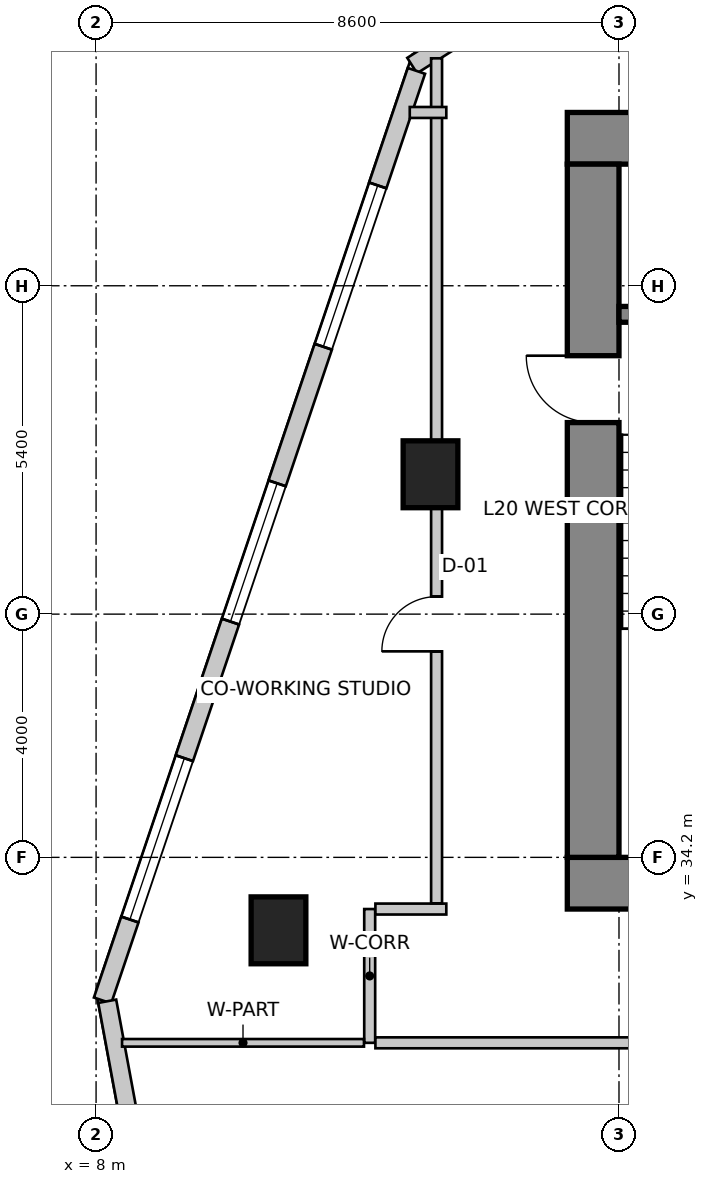
"""IFC4 building model, lengths in metres.
Left out: names, types, materials, properties, quantities, classifications, styles, units other than length and angle.
Written with IfcOpenShell. Run it as: python <this file> out.ifc"""

import sys

from ifc_helpers import new_model, si_unit, direction, frame, frame_2d, origin, origin_2d, place, context, subcontext, project, spatial, rectangle, extrude, source, transform, mapped, element, fill, save


model = new_model("IFC4")
c1 = context("Model", 3, precision=1e-05, world=origin(), true_north=direction((0.0, 1.0)))
c2 = subcontext(c1, "Body", "Model", "MODEL_VIEW")
j1 = project(units=[si_unit("LENGTHUNIT", "METRE"), si_unit("PLANEANGLEUNIT", "RADIAN")], contexts=[c1])
p1 = place(None, origin())
s1 = spatial("IfcSite", under=j1, at=p1, CompositionType="ELEMENT")
p2 = place(p1, origin())
s2 = spatial("IfcBuilding", under=s1, at=p2, CompositionType="ELEMENT")
p3 = place(p2, frame((0.0, 0.0, 83.0)))
s3 = spatial("IfcBuildingStorey", under=s2, at=p3, CompositionType="ELEMENT", Elevation=83.0)
p4 = place(p3, frame((15.75, 46.025, 0.0), z_axis=(0.0, 0.0, 1.0), x_axis=(1.0, 0.0, 0.0)))
e1 = element("IfcWall", 1, at=p4, inside=s3, PredefinedType="SHEAR", context=c2, shape_type="SweptSolid", body=[
    extrude(rectangle(XDim=16.1, YDim=0.85, at=frame_2d((8.05, 0.0))), origin(), (0.0, 0.0, 1.0), 4.0),
])
p5 = place(p3, frame((15.75, 33.775, 0.0), z_axis=(0.0, 0.0, 1.0), x_axis=(1.0, 0.0, 0.0)))
e2 = element("IfcWall", 2, at=p5, inside=s3, PredefinedType="SHEAR", context=c2, shape_type="SweptSolid", body=[
    extrude(rectangle(XDim=16.1, YDim=0.85, at=frame_2d((8.05, 0.0))), origin(), (0.0, 0.0, 1.0), 4.0),
])
m1 = source(origin(), c2, "Body", "SweptSolid", [
    extrude(rectangle(XDim=1.3, YDim=2.15, at=frame_2d((0.65, 1.075))), frame((0.0, 0.435, 0.0), z_axis=(0.0, -1.0, 0.0), x_axis=(1.0, 0.0, 0.0)), (0.0, 0.0, 1.0), 0.87),
])
p6 = place(p5, frame((10.18, 0.0, 0.0)))
e3 = element("IfcOpeningElement", 3, at=p6, cuts=e2, PredefinedType="OPENING", context=c2, shape_type="MappedRepresentation", body=[
    mapped(m1, transform((0.0, 0.0, 0.0), scale=1.0)),
])
p7 = place(p3, frame((16.175, 34.2, 0.0), z_axis=(0.0, 0.0, 1.0), x_axis=(0.0, 1.0, 0.0)))
e4 = element("IfcWall", 4, at=p7, inside=s3, PredefinedType="SHEAR", context=c2, shape_type="SweptSolid", body=[
    extrude(rectangle(XDim=11.4, YDim=0.85, at=frame_2d((5.7, 0.0))), origin(), (0.0, 0.0, 1.0), 4.0),
])
m2 = source(origin(), c2, "Body", "SweptSolid", [
    extrude(rectangle(XDim=1.1, YDim=2.15, at=frame_2d((0.55, 1.075))), frame((0.0, 0.435, 0.0), z_axis=(0.0, -1.0, 0.0), x_axis=(1.0, 0.0, 0.0)), (0.0, 0.0, 1.0), 0.87),
])
p8 = place(p7, frame((7.15, 0.0, 0.0)))
e5 = element("IfcOpeningElement", 5, at=p8, cuts=e4, PredefinedType="OPENING", context=c2, shape_type="MappedRepresentation", body=[
    mapped(m2, transform((0.0, 0.0, 0.0), scale=1.0)),
])
p9 = place(p3, frame((16.6, 43.13, 0.0), z_axis=(0.0, 0.0, 1.0), x_axis=(1.0, 0.0, 0.0)))
e6 = element("IfcWall", 6, at=p9, inside=s3, PredefinedType="SHEAR", context=c2, shape_type="SweptSolid", body=[
    extrude(rectangle(XDim=3.5, YDim=0.26, at=frame_2d((1.75, 0.0))), origin(), (0.0, 0.0, 1.0), 4.0),
])
m3 = source(origin(), c2, "Body", "SweptSolid", [
    extrude(rectangle(XDim=0.9, YDim=1.1, at=origin_2d()), origin(), (0.0, 0.0, 1.0), 4.0),
])
for number, where, z_axis, x_axis in (
    (7, (11.0, 33.0, 0.0), (0.0, 0.0, 1.0), (1.0, 0.0, 0.0)),
    (8, (13.5, 40.5, 0.0), (0.0, 0.0, 1.0), (1.0, 0.0, 0.0)),
):
    element("IfcColumn", number, at=place(p3, frame(where, z_axis=z_axis, x_axis=x_axis)), inside=s3, PredefinedType="COLUMN", context=c2, shape_type="MappedRepresentation", body=[
        mapped(m3, transform((0.0, 0.0, 0.0), scale=1.0)),
    ])
p10 = place(p3, frame((21.875, 52.742, 0.0), z_axis=(0.0, 0.0, 1.0), x_axis=(-0.843662465249, -0.536873956092, 0.0)))
e9 = element("IfcWall", 9, at=p10, inside=s3, PredefinedType="SOLIDWALL", context=c2, shape_type="SweptSolid", body=[
    extrude(rectangle(XDim=10.284, YDim=0.3, at=frame_2d((5.142, 0.0))), origin(), (0.0, 0.0, 1.0), 3.75),
])
m4 = source(origin(), c2, "Body", "SweptSolid", [
    extrude(rectangle(XDim=0.9, YDim=1.6, at=frame_2d((0.45, 0.8))), frame((0.0, 0.16, 0.0), z_axis=(0.0, -1.0, 0.0), x_axis=(1.0, 0.0, 0.0)), (0.0, 0.0, 1.0), 0.32),
])
p11 = place(p10, frame((0.629, 0.0, 0.85)))
e10 = element("IfcOpeningElement", 10, at=p11, cuts=e9, PredefinedType="OPENING", context=c2, shape_type="MappedRepresentation", body=[
    mapped(m4, transform((0.0, 0.0, 0.0), scale=1.0)),
])
m5 = source(origin(), c2, "Body", "SweptSolid", [
    extrude(rectangle(XDim=2.4, YDim=2.2, at=frame_2d((1.2, 1.1))), frame((0.0, 0.16, 0.0), z_axis=(0.0, -1.0, 0.0), x_axis=(1.0, 0.0, 0.0)), (0.0, 0.0, 1.0), 0.32),
])
p12 = place(p10, frame((3.542, 0.0, 0.85)))
e11 = element("IfcOpeningElement", 11, at=p12, cuts=e9, PredefinedType="OPENING", context=c2, shape_type="MappedRepresentation", body=[
    mapped(m5, transform((0.0, 0.0, 0.0), scale=1.0)),
])
m6 = source(origin(), c2, "Body", "SweptSolid", [
    extrude(rectangle(XDim=1.5, YDim=1.8, at=frame_2d((0.75, 0.9))), frame((0.0, 0.16, 0.0), z_axis=(0.0, -1.0, 0.0), x_axis=(1.0, 0.0, 0.0)), (0.0, 0.0, 1.0), 0.32),
])
p13 = place(p10, frame((7.903, 0.0, 0.85)))
e12 = element("IfcOpeningElement", 12, at=p13, cuts=e9, PredefinedType="OPENING", context=c2, shape_type="MappedRepresentation", body=[
    mapped(m6, transform((0.0, 0.0, 0.0), scale=1.0)),
])
p14 = place(p3, frame((13.269, 47.134, 0.0), z_axis=(0.0, 0.0, 1.0), x_axis=(-0.319920423265, -0.947444416722, 0.0)))
e13 = element("IfcWall", 13, at=p14, inside=s3, PredefinedType="SOLIDWALL", context=c2, shape_type="SweptSolid", body=[
    extrude(rectangle(XDim=16.135, YDim=0.3, at=frame_2d((8.067, 0.0))), origin(), (0.0, 0.0, 1.0), 3.75),
])
m7 = source(origin(), c2, "Body", "SweptSolid", [
    extrude(rectangle(XDim=2.8, YDim=2.4, at=frame_2d((1.4, 1.2))), frame((0.0, 0.16, 0.0), z_axis=(0.0, -1.0, 0.0), x_axis=(1.0, 0.0, 0.0)), (0.0, 0.0, 1.0), 0.32),
])
p15 = place(p14, frame((1.988, 0.0, 0.85)))
e14 = element("IfcOpeningElement", 14, at=p15, cuts=e13, PredefinedType="OPENING", context=c2, shape_type="MappedRepresentation", body=[
    mapped(m7, transform((0.0, 0.0, 0.0), scale=1.0)),
])
p16 = place(p14, frame((7.159, 0.0, 0.85)))
e15 = element("IfcOpeningElement", 15, at=p16, cuts=e13, PredefinedType="OPENING", context=c2, shape_type="MappedRepresentation", body=[
    mapped(m5, transform((0.0, 0.0, 0.0), scale=1.0)),
])
p17 = place(p14, frame((11.93, 0.0, 0.85)))
e16 = element("IfcOpeningElement", 16, at=p17, cuts=e13, PredefinedType="OPENING", context=c2, shape_type="MappedRepresentation", body=[
    mapped(m7, transform((0.0, 0.0, 0.0), scale=1.0)),
])
p18 = place(p3, frame((8.183, 31.833, 0.0), z_axis=(0.0, 0.0, 1.0), x_axis=(0.18216364648, -0.983268226834, 0.0)))
e17 = element("IfcWall", 17, at=p18, inside=s3, PredefinedType="SOLIDWALL", context=c2, shape_type="SweptSolid", body=[
    extrude(rectangle(XDim=26.678, YDim=0.3, at=frame_2d((13.339, 0.0))), origin(), (0.0, 0.0, 1.0), 3.75),
])
p19 = place(p18, frame((3.152, 0.0, 0.85)))
e18 = element("IfcOpeningElement", 18, at=p19, cuts=e17, PredefinedType="OPENING", context=c2, shape_type="MappedRepresentation", body=[
    mapped(m5, transform((0.0, 0.0, 0.0), scale=1.0)),
])
p20 = place(p18, frame((9.076, 0.0, 0.85)))
e19 = element("IfcOpeningElement", 19, at=p20, cuts=e17, PredefinedType="OPENING", context=c2, shape_type="MappedRepresentation", body=[
    mapped(m5, transform((0.0, 0.0, 0.0), scale=1.0)),
])
p21 = place(p18, frame((13.653, 0.0, 0.85)))
e20 = element("IfcOpeningElement", 20, at=p21, cuts=e17, PredefinedType="OPENING", context=c2, shape_type="MappedRepresentation", body=[
    mapped(m5, transform((0.0, 0.0, 0.0), scale=1.0)),
])
p22 = place(p18, frame((18.411, 0.0, 0.85)))
e21 = element("IfcOpeningElement", 21, at=p22, cuts=e17, PredefinedType="OPENING", context=c2, shape_type="MappedRepresentation", body=[
    mapped(m5, transform((0.0, 0.0, 0.0), scale=1.0)),
])
p23 = place(p18, frame((22.709, 0.0, 0.85)))
e22 = element("IfcOpeningElement", 22, at=p23, cuts=e17, PredefinedType="OPENING", context=c2, shape_type="MappedRepresentation", body=[
    mapped(m7, transform((0.0, 0.0, 0.0), scale=1.0)),
])
p24 = place(p3, frame((12.5, 31.15, 0.0), z_axis=(0.0, 0.0, 1.0), x_axis=(0.0, 1.0, 0.0)))
e23 = element("IfcWall", 23, at=p24, inside=s3, PredefinedType="PARTITIONING", context=c2, shape_type="SweptSolid", body=[
    extrude(rectangle(XDim=2.2, YDim=0.18, at=frame_2d((1.1, 0.0))), origin(), (0.0, 0.0, 1.0), 3.434),
])
p25 = place(p3, frame((12.594, 33.35, 0.0), z_axis=(0.0, 0.0, 1.0), x_axis=(1.0, 0.0, 0.0)))
e24 = element("IfcWall", 24, at=p25, inside=s3, PredefinedType="PARTITIONING", context=c2, shape_type="SweptSolid", body=[
    extrude(rectangle(XDim=1.166, YDim=0.18, at=frame_2d((0.583, 0.0))), origin(), (0.0, 0.0, 1.0), 3.75),
])
p26 = place(p3, frame((17.96, 31.15, 0.0), z_axis=(0.0, 0.0, 1.0), x_axis=(-1.0, 0.0, 0.0)))
e25 = element("IfcWall", 25, at=p26, inside=s3, PredefinedType="PARTITIONING", context=c2, shape_type="SweptSolid", body=[
    extrude(rectangle(XDim=5.366, YDim=0.18, at=frame_2d((2.683, 0.0))), origin(), (0.0, 0.0, 1.0), 3.434),
])
p27 = place(p3, frame((13.6, 33.444, 0.0), z_axis=(0.0, 0.0, 1.0), x_axis=(0.0, 1.0, 0.0)))
e26 = element("IfcWall", 26, at=p27, inside=s3, PredefinedType="PARTITIONING", context=c2, shape_type="SweptSolid", body=[
    extrude(rectangle(XDim=13.896, YDim=0.18, at=frame_2d((6.948, 0.0))), origin(), (0.0, 0.0, 1.0), 2.892),
])
m8 = source(origin(), c2, "Body", "SweptSolid", [
    extrude(rectangle(XDim=0.9, YDim=2.15, at=frame_2d((0.45, 1.075))), frame((0.0, 0.1, 0.0), z_axis=(0.0, -1.0, 0.0), x_axis=(1.0, 0.0, 0.0)), (0.0, 0.0, 1.0), 0.2),
])
p28 = place(p27, frame((4.144, 0.0, 0.0)))
e27 = element("IfcOpeningElement", 27, at=p28, cuts=e26, PredefinedType="OPENING", context=c2, shape_type="MappedRepresentation", body=[
    mapped(m8, transform((0.0, 0.0, 0.0), scale=1.0)),
])
p29 = place(p3, frame((13.76, 46.45, 0.0), z_axis=(0.0, 0.0, 1.0), x_axis=(-1.0, 0.0, 0.0)))
e28 = element("IfcWall", 28, at=p29, inside=s3, PredefinedType="PARTITIONING", context=c2, shape_type="SweptSolid", body=[
    extrude(rectangle(XDim=0.601, YDim=0.18, at=frame_2d((0.301, 0.0))), origin(), (0.0, 0.0, 1.0), 3.75),
])
p30 = place(p3, frame((12.406, 31.15, 0.0), z_axis=(0.0, 0.0, 1.0), x_axis=(-1.0, 0.0, 0.0)))
e29 = element("IfcWall", 29, at=p30, inside=s3, PredefinedType="PARTITIONING", context=c2, shape_type="SweptSolid", body=[
    extrude(rectangle(XDim=3.979, YDim=0.125, at=frame_2d((1.99, 0.0))), origin(), (0.0, 0.0, 1.0), 2.892),
])
m9 = source(origin(), c2, "Body", "SweptSolid", [
    extrude(rectangle(XDim=2.8, YDim=2.4, at=frame_2d((1.4, 1.2))), frame((0.0, -0.015, 0.0), z_axis=(0.0, -1.0, 0.0), x_axis=(1.0, 0.0, 0.0)), (0.0, 0.0, 1.0), 0.06),
])
p31 = place(p15, origin())
e30 = element("IfcWindow", 30, at=p31, inside=s3, PartitioningType="SINGLE_PANEL", PredefinedType="WINDOW", context=c2, shape_type="MappedRepresentation", body=[
    mapped(m9, transform((0.0, 0.0, 0.0), scale=1.0)),
])
fill(e14, e30)
m10 = source(origin(), c2, "Body", "SweptSolid", [
    extrude(rectangle(XDim=2.4, YDim=2.2, at=frame_2d((1.2, 1.1))), frame((0.0, -0.015, 0.0), z_axis=(0.0, -1.0, 0.0), x_axis=(1.0, 0.0, 0.0)), (0.0, 0.0, 1.0), 0.06),
])
p32 = place(p16, origin())
e31 = element("IfcWindow", 31, at=p32, inside=s3, PartitioningType="SINGLE_PANEL", PredefinedType="WINDOW", context=c2, shape_type="MappedRepresentation", body=[
    mapped(m10, transform((0.0, 0.0, 0.0), scale=1.0)),
])
fill(e15, e31)
p33 = place(p17, origin())
e32 = element("IfcWindow", 32, at=p33, inside=s3, PartitioningType="SINGLE_PANEL", PredefinedType="WINDOW", context=c2, shape_type="MappedRepresentation", body=[
    mapped(m9, transform((0.0, 0.0, 0.0), scale=1.0)),
])
fill(e16, e32)
m11 = source(origin(), c2, "Body", "SweptSolid", [
    extrude(rectangle(XDim=1.1, YDim=2.15, at=frame_2d((0.55, 1.075))), frame((0.0, 0.025, 0.0), z_axis=(0.0, -1.0, 0.0), x_axis=(1.0, 0.0, 0.0)), (0.0, 0.0, 1.0), 0.05),
])
p34 = place(p8, origin())
e33 = element("IfcDoor", 33, at=p34, inside=s3, OperationType="SINGLE_SWING_RIGHT", PredefinedType="DOOR", context=c2, shape_type="MappedRepresentation", body=[
    mapped(m11, transform((0.0, 0.0, 0.0), scale=1.0)),
])
fill(e5, e33)
m12 = source(origin(), c2, "Body", "SweptSolid", [
    extrude(rectangle(XDim=0.9, YDim=2.15, at=frame_2d((0.45, 1.075))), frame((0.0, 0.025, 0.0), z_axis=(0.0, -1.0, 0.0), x_axis=(1.0, 0.0, 0.0)), (0.0, 0.0, 1.0), 0.05),
])
p35 = place(p28, origin())
e34 = element("IfcDoor", 34, at=p35, inside=s3, OperationType="SINGLE_SWING_LEFT", PredefinedType="DOOR", context=c2, shape_type="MappedRepresentation", body=[
    mapped(m12, transform((0.0, 0.0, 0.0), scale=1.0)),
])
fill(e27, e34)
save(model, sys.argv[1])
